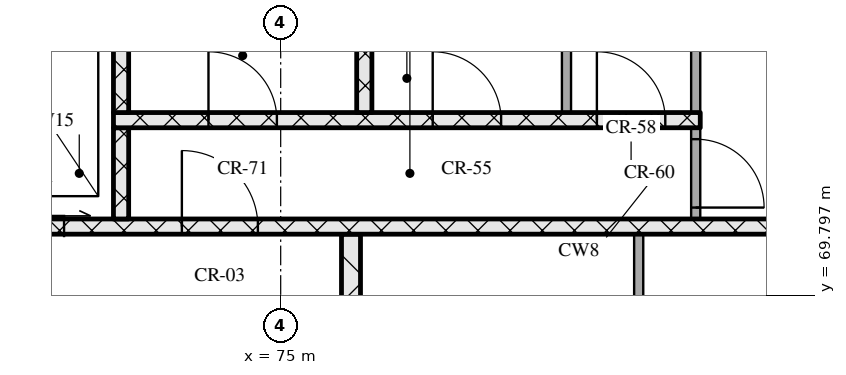
"""IFC4 building model, lengths in metres.
Left out: names, types, materials, properties, quantities, classifications, styles, units other than length and angle.
Written with IfcOpenShell. Run it as: python <this file> out.ifc"""

import sys

from ifc_helpers import new_model, si_unit, direction, frame, frame_2d, origin, place, context, subcontext, project, spatial, rectangle, extrude, element, fill, save


model = new_model("IFC4")
c1 = context("Model", 3, precision=1e-05, world=origin(), true_north=direction((0.0, 1.0)))
c2 = subcontext(c1, "Body", "Model", "MODEL_VIEW")
j1 = project(units=[si_unit("LENGTHUNIT", "METRE"), si_unit("PLANEANGLEUNIT", "RADIAN")], contexts=[c1])
p1 = place(None, origin())
s1 = spatial("IfcSite", under=j1, at=p1, CompositionType="ELEMENT")
p2 = place(p1, origin())
s2 = spatial("IfcBuilding", under=s1, at=p2, CompositionType="ELEMENT")
p3 = place(p2, frame((0.0, 0.0, 169.05)))
s3 = spatial("IfcBuildingStorey", under=s2, at=p3, CompositionType="ELEMENT", Elevation=169.05)
p4 = place(p3, frame((79.71, 68.0, 0.0), z_axis=(0.0, 0.0, 1.0), x_axis=(0.0, 1.0, 0.0)))
e1 = element("IfcWall", 1, at=p4, inside=s3, PredefinedType="PARTITIONING", context=c2, shape_type="SweptSolid", body=[
    extrude(rectangle(XDim=2.6, YDim=0.12, at=frame_2d((1.3, 0.0))), origin(), (0.0, 0.0, 1.0), 3.32),
])
p5 = place(p3, frame((75.925, 68.3, 0.0), z_axis=(0.0, 0.0, 1.0), x_axis=(0.0, 1.0, 0.0)))
e2 = element("IfcWall", 2, at=p5, inside=s3, PredefinedType="SOLIDWALL", context=c2, shape_type="SweptSolid", body=[
    extrude(rectangle(XDim=2.3, YDim=0.25, at=frame_2d((1.15, 0.0))), origin(), (0.0, 0.0, 1.0), 3.32),
])
p6 = place(p3, frame((67.8, 70.7, 0.0), z_axis=(0.0, 0.0, 1.0), x_axis=(1.0, 0.0, 0.0)))
e3 = element("IfcWall", 3, at=p6, inside=s3, PredefinedType="SOLIDWALL", context=c2, shape_type="SweptSolid", body=[
    extrude(rectangle(XDim=39.6, YDim=0.2, at=frame_2d((19.8, 0.0))), origin(), (0.0, 0.0, 1.0), 3.32),
])
p7 = place(p6, frame((0.65, 0.0, 0.0)))
e4 = element("IfcOpeningElement", 4, at=p7, cuts=e3, PredefinedType="OPENING", context=c2, shape_type="SweptSolid", body=[
    extrude(rectangle(XDim=1.1, YDim=2.1, at=frame_2d((0.55, 1.05))), frame((0.0, 0.11, 0.0), z_axis=(0.0, -1.0, 0.0), x_axis=(1.0, 0.0, 0.0)), (0.0, 0.0, 1.0), 0.22),
])
p8 = place(p6, frame((3.25, 0.0, 0.0)))
e5 = element("IfcOpeningElement", 5, at=p8, cuts=e3, PredefinedType="OPENING", context=c2, shape_type="SweptSolid", body=[
    extrude(rectangle(XDim=1.1, YDim=2.1, at=frame_2d((0.55, 1.05))), frame((0.0, 0.11, 0.0), z_axis=(0.0, -1.0, 0.0), x_axis=(1.0, 0.0, 0.0)), (0.0, 0.0, 1.0), 0.22),
])
p9 = place(p6, frame((5.9, 0.0, 0.0)))
e6 = element("IfcOpeningElement", 6, at=p9, cuts=e3, PredefinedType="OPENING", context=c2, shape_type="SweptSolid", body=[
    extrude(rectangle(XDim=1.0, YDim=2.1, at=frame_2d((0.5, 1.05))), frame((0.0, 0.11, 0.0), z_axis=(0.0, -1.0, 0.0), x_axis=(1.0, 0.0, 0.0)), (0.0, 0.0, 1.0), 0.22),
])
p10 = place(p6, frame((21.7, 0.0, 0.0)))
e7 = element("IfcOpeningElement", 7, at=p10, cuts=e3, PredefinedType="OPENING", context=c2, shape_type="SweptSolid", body=[
    extrude(rectangle(XDim=1.0, YDim=2.1, at=frame_2d((0.5, 1.05))), frame((0.0, 0.11, 0.0), z_axis=(0.0, -1.0, 0.0), x_axis=(1.0, 0.0, 0.0)), (0.0, 0.0, 1.0), 0.22),
])
p11 = place(p6, frame((32.7, 0.0, 0.0)))
e8 = element("IfcOpeningElement", 8, at=p11, cuts=e3, PredefinedType="OPENING", context=c2, shape_type="SweptSolid", body=[
    extrude(rectangle(XDim=1.0, YDim=2.1, at=frame_2d((0.5, 1.05))), frame((0.0, 0.11, 0.0), z_axis=(0.0, -1.0, 0.0), x_axis=(1.0, 0.0, 0.0)), (0.0, 0.0, 1.0), 0.22),
])
p12 = place(p6, frame((35.25, 0.0, 0.0)))
e9 = element("IfcOpeningElement", 9, at=p12, cuts=e3, PredefinedType="OPENING", context=c2, shape_type="SweptSolid", body=[
    extrude(rectangle(XDim=1.1, YDim=2.1, at=frame_2d((0.55, 1.05))), frame((0.0, 0.11, 0.0), z_axis=(0.0, -1.0, 0.0), x_axis=(1.0, 0.0, 0.0)), (0.0, 0.0, 1.0), 0.22),
])
p13 = place(p6, frame((37.85, 0.0, 0.0)))
e10 = element("IfcOpeningElement", 10, at=p13, cuts=e3, PredefinedType="OPENING", context=c2, shape_type="SweptSolid", body=[
    extrude(rectangle(XDim=1.1, YDim=2.1, at=frame_2d((0.55, 1.05))), frame((0.0, 0.11, 0.0), z_axis=(0.0, -1.0, 0.0), x_axis=(1.0, 0.0, 0.0)), (0.0, 0.0, 1.0), 0.22),
])
p14 = place(p3, frame((72.9, 70.8, 0.0), z_axis=(0.0, 0.0, 1.0), x_axis=(0.0, 1.0, 0.0)))
e11 = element("IfcWall", 11, at=p14, inside=s3, PredefinedType="SOLIDWALL", context=c2, shape_type="SweptSolid", body=[
    extrude(rectangle(XDim=1.2, YDim=0.2, at=frame_2d((0.6, 0.0))), origin(), (0.0, 0.0, 1.0), 3.32),
])
p15 = place(p3, frame((80.46, 70.8, 0.0), z_axis=(0.0, 0.0, 1.0), x_axis=(0.0, 1.0, 0.0)))
e12 = element("IfcWall", 12, at=p15, inside=s3, PredefinedType="PARTITIONING", context=c2, shape_type="SweptSolid", body=[
    extrude(rectangle(XDim=1.2, YDim=0.12, at=frame_2d((0.6, 0.0))), origin(), (0.0, 0.0, 1.0), 3.32),
])
p16 = place(p15, frame((0.15, 0.0, 0.0)))
e13 = element("IfcOpeningElement", 13, at=p16, cuts=e12, PredefinedType="OPENING", context=c2, shape_type="SweptSolid", body=[
    extrude(rectangle(XDim=0.9, YDim=2.1, at=frame_2d((0.45, 1.05))), frame((0.0, 0.07, 0.0), z_axis=(0.0, -1.0, 0.0), x_axis=(1.0, 0.0, 0.0)), (0.0, 0.0, 1.0), 0.14),
])
p17 = place(p3, frame((72.8, 72.1, 0.0), z_axis=(0.0, 0.0, 1.0), x_axis=(1.0, 0.0, 0.0)))
e14 = element("IfcWall", 14, at=p17, inside=s3, PredefinedType="SOLIDWALL", context=c2, shape_type="SweptSolid", body=[
    extrude(rectangle(XDim=7.72, YDim=0.2, at=frame_2d((3.86, 0.0))), origin(), (0.0, 0.0, 1.0), 3.32),
])
p18 = place(p17, frame((1.25, 0.0, 0.0)))
e15 = element("IfcOpeningElement", 15, at=p18, cuts=e14, PredefinedType="OPENING", context=c2, shape_type="SweptSolid", body=[
    extrude(rectangle(XDim=0.9, YDim=2.1, at=frame_2d((0.45, 1.05))), frame((0.0, 0.11, 0.0), z_axis=(0.0, -1.0, 0.0), x_axis=(1.0, 0.0, 0.0)), (0.0, 0.0, 1.0), 0.22),
])
p19 = place(p17, frame((4.2, 0.0, 0.0)))
e16 = element("IfcOpeningElement", 16, at=p19, cuts=e14, PredefinedType="OPENING", context=c2, shape_type="SweptSolid", body=[
    extrude(rectangle(XDim=0.9, YDim=2.1, at=frame_2d((0.45, 1.05))), frame((0.0, 0.11, 0.0), z_axis=(0.0, -1.0, 0.0), x_axis=(1.0, 0.0, 0.0)), (0.0, 0.0, 1.0), 0.22),
])
p20 = place(p17, frame((6.36, 0.0, 0.0)))
e17 = element("IfcOpeningElement", 17, at=p20, cuts=e14, PredefinedType="OPENING", context=c2, shape_type="SweptSolid", body=[
    extrude(rectangle(XDim=0.9, YDim=2.1, at=frame_2d((0.45, 1.05))), frame((0.0, 0.11, 0.0), z_axis=(0.0, -1.0, 0.0), x_axis=(1.0, 0.0, 0.0)), (0.0, 0.0, 1.0), 0.22),
])
for number, where, z_axis, x_axis in (
    (18, (72.9, 72.2, 0.0), (0.0, 0.0, 1.0), (0.0, 1.0, 0.0)),
    (19, (76.1, 72.2, 0.0), (0.0, 0.0, 1.0), (0.0, 1.0, 0.0)),
):
    element("IfcWall", number, at=place(p3, frame(where, z_axis=z_axis, x_axis=x_axis)), inside=s3, PredefinedType="SOLIDWALL", context=c2, shape_type="SweptSolid", body=[
        extrude(rectangle(XDim=2.2, YDim=0.2, at=frame_2d((1.1, 0.0))), origin(), (0.0, 0.0, 1.0), 3.32),
    ])
for number, where, z_axis, x_axis in (
    (20, (78.76, 72.2, 0.0), (0.0, 0.0, 1.0), (0.0, 1.0, 0.0)),
    (21, (80.46, 72.2, 0.0), (0.0, 0.0, 1.0), (0.0, 1.0, 0.0)),
):
    element("IfcWall", number, at=place(p3, frame(where, z_axis=z_axis, x_axis=x_axis)), inside=s3, PredefinedType="PARTITIONING", context=c2, shape_type="SweptSolid", body=[
        extrude(rectangle(XDim=2.2, YDim=0.12, at=frame_2d((1.1, 0.0))), origin(), (0.0, 0.0, 1.0), 3.32),
    ])
p21 = place(p8, origin())
e22 = element("IfcDoor", 22, at=p21, inside=s3, OperationType="SLIDING_TO_RIGHT", PredefinedType="DOOR", context=c2, shape_type="SweptSolid", body=[
    extrude(rectangle(XDim=1.1, YDim=2.1, at=frame_2d((0.55, 1.05))), frame((0.0, 0.025, 0.0), z_axis=(0.0, -1.0, 0.0), x_axis=(1.0, 0.0, 0.0)), (0.0, 0.0, 1.0), 0.05),
])
fill(e5, e22)
p22 = place(p9, origin())
e23 = element("IfcDoor", 23, at=p22, inside=s3, OperationType="SINGLE_SWING_LEFT", PredefinedType="DOOR", context=c2, shape_type="SweptSolid", body=[
    extrude(rectangle(XDim=1.0, YDim=2.1, at=frame_2d((0.5, 1.05))), frame((0.0, 0.025, 0.0), z_axis=(0.0, -1.0, 0.0), x_axis=(1.0, 0.0, 0.0)), (0.0, 0.0, 1.0), 0.05),
])
fill(e6, e23)
p23 = place(p16, origin())
e24 = element("IfcDoor", 24, at=p23, inside=s3, OperationType="SINGLE_SWING_RIGHT", PredefinedType="DOOR", context=c2, shape_type="SweptSolid", body=[
    extrude(rectangle(XDim=0.9, YDim=2.1, at=frame_2d((0.45, 1.05))), frame((0.0, 0.025, 0.0), z_axis=(0.0, -1.0, 0.0), x_axis=(1.0, 0.0, 0.0)), (0.0, 0.0, 1.0), 0.05),
])
fill(e13, e24)
p24 = place(p18, origin())
e25 = element("IfcDoor", 25, at=p24, inside=s3, OperationType="SINGLE_SWING_LEFT", PredefinedType="DOOR", context=c2, shape_type="SweptSolid", body=[
    extrude(rectangle(XDim=0.9, YDim=2.1, at=frame_2d((0.45, 1.05))), frame((0.0, 0.025, 0.0), z_axis=(0.0, -1.0, 0.0), x_axis=(1.0, 0.0, 0.0)), (0.0, 0.0, 1.0), 0.05),
])
fill(e15, e25)
p25 = place(p19, origin())
e26 = element("IfcDoor", 26, at=p25, inside=s3, OperationType="SINGLE_SWING_LEFT", PredefinedType="DOOR", context=c2, shape_type="SweptSolid", body=[
    extrude(rectangle(XDim=0.9, YDim=2.1, at=frame_2d((0.45, 1.05))), frame((0.0, 0.025, 0.0), z_axis=(0.0, -1.0, 0.0), x_axis=(1.0, 0.0, 0.0)), (0.0, 0.0, 1.0), 0.05),
])
fill(e16, e26)
p26 = place(p20, origin())
e27 = element("IfcDoor", 27, at=p26, inside=s3, OperationType="SINGLE_SWING_LEFT", PredefinedType="DOOR", context=c2, shape_type="SweptSolid", body=[
    extrude(rectangle(XDim=0.9, YDim=2.1, at=frame_2d((0.45, 1.05))), frame((0.0, 0.025, 0.0), z_axis=(0.0, -1.0, 0.0), x_axis=(1.0, 0.0, 0.0)), (0.0, 0.0, 1.0), 0.05),
])
fill(e17, e27)
save(model, sys.argv[1])
